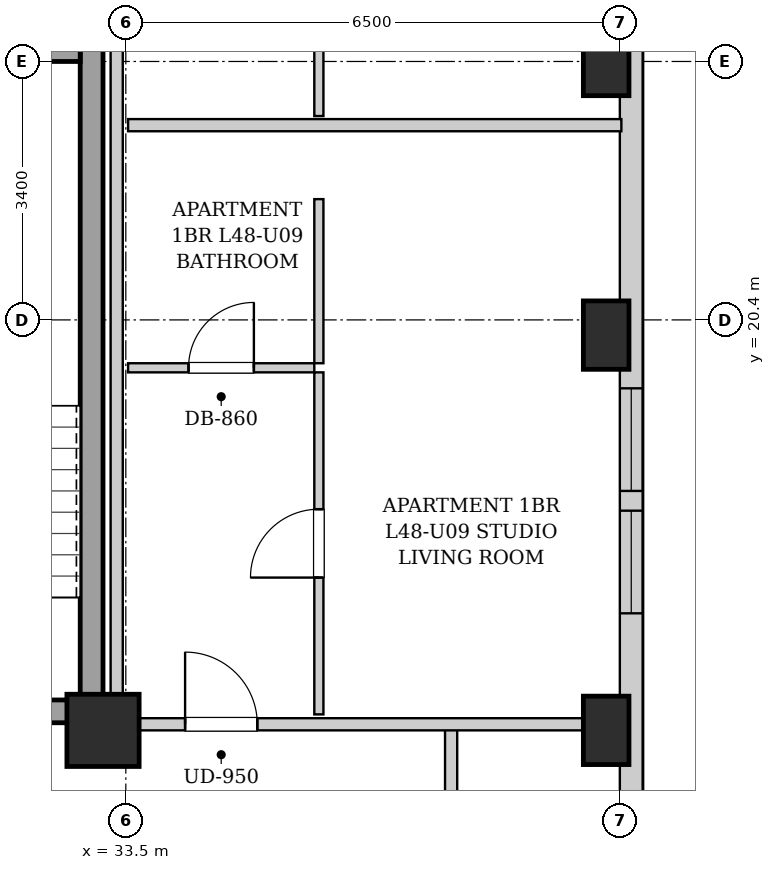
"""IFC4 building model, lengths in metres.
Left out: names, types, materials, properties, quantities, classifications, styles, units other than length and angle.
Written with IfcOpenShell. Run it as: python <this file> out.ifc"""

import sys

from ifc_helpers import new_model, si_unit, direction, frame, frame_2d, origin, origin_2d, place, context, subcontext, project, spatial, rectangle, extrude, element, fill, save


model = new_model("IFC4")
c1 = context("Model", 3, precision=1e-05, world=origin(), true_north=direction((0.0, 1.0)))
c2 = subcontext(c1, "Body", "Model", "MODEL_VIEW")
j1 = project(units=[si_unit("LENGTHUNIT", "METRE"), si_unit("PLANEANGLEUNIT", "RADIAN")], contexts=[c1])
p1 = place(None, origin())
s1 = spatial("IfcSite", under=j1, at=p1, CompositionType="ELEMENT")
p2 = place(p1, origin())
s2 = spatial("IfcBuilding", under=s1, at=p2, CompositionType="ELEMENT")
p3 = place(p2, frame((0.0, 0.0, 166.65)))
s3 = spatial("IfcBuildingStorey", under=s2, at=p3, CompositionType="ELEMENT", Elevation=166.65)
for number, where, z_axis, x_axis in (
    (1, (39.82, 15.0, 0.0), (0.0, 0.0, 1.0), (1.0, 0.0, 0.0)),
    (2, (39.82, 20.2, 0.0), (0.0, 0.0, 1.0), (1.0, 0.0, 0.0)),
    (3, (39.82, 23.8, 0.0), (0.0, 0.0, 1.0), (1.0, 0.0, 0.0)),
):
    element("IfcColumn", number, at=place(p3, frame(where, z_axis=z_axis, x_axis=x_axis)), inside=s3, PredefinedType="COLUMN", context=c2, shape_type="SweptSolid", body=[
        extrude(rectangle(XDim=0.6, YDim=0.9, at=origin_2d()), origin(), (0.0, 0.0, 1.0), 3.25),
    ])
p4 = place(p3, frame((33.2, 15.0, 0.0), z_axis=(0.0, 0.0, 1.0), x_axis=(1.0, 0.0, 0.0)))
e4 = element("IfcColumn", 4, at=p4, inside=s3, PredefinedType="COLUMN", context=c2, shape_type="SweptSolid", body=[
    extrude(rectangle(XDim=0.95, YDim=0.95, at=origin_2d()), origin(), (0.0, 0.0, 1.0), 3.25),
])
p5 = place(p3, frame((40.15, 40.8, 0.0), z_axis=(0.0, 0.0, 1.0), x_axis=(0.0, -1.0, 0.0)))
e5 = element("IfcWall", 5, at=p5, inside=s3, PredefinedType="SOLIDWALL", context=c2, shape_type="SweptSolid", body=[
    extrude(rectangle(XDim=34.5, YDim=0.3, at=frame_2d((17.25, 0.0))), origin(), (0.0, 0.0, 1.0), 2.93),
])
p6 = place(p5, frame((31.725, 0.0, 0.55)))
e6 = element("IfcOpeningElement", 6, at=p6, cuts=e5, PredefinedType="OPENING", context=c2, shape_type="SweptSolid", body=[
    extrude(rectangle(XDim=1.35, YDim=1.2, at=frame_2d((0.675, 0.6))), frame((0.0, 0.16, 0.0), z_axis=(0.0, -1.0, 0.0), x_axis=(1.0, 0.0, 0.0)), (0.0, 0.0, 1.0), 0.32),
])
p7 = place(p5, frame((3.0, 0.0, 0.55)))
e7 = element("IfcOpeningElement", 7, at=p7, cuts=e5, PredefinedType="OPENING", context=c2, shape_type="SweptSolid", body=[
    extrude(rectangle(XDim=1.35, YDim=1.2, at=frame_2d((0.675, 0.6))), frame((0.0, 0.16, 0.0), z_axis=(0.0, -1.0, 0.0), x_axis=(1.0, 0.0, 0.0)), (0.0, 0.0, 1.0), 0.32),
])
p8 = place(p5, frame((1.085, 0.0, 0.55)))
e8 = element("IfcOpeningElement", 8, at=p8, cuts=e5, PredefinedType="OPENING", context=c2, shape_type="SweptSolid", body=[
    extrude(rectangle(XDim=1.35, YDim=1.2, at=frame_2d((0.675, 0.6))), frame((0.0, 0.16, 0.0), z_axis=(0.0, -1.0, 0.0), x_axis=(1.0, 0.0, 0.0)), (0.0, 0.0, 1.0), 0.32),
])
p9 = place(p5, frame((21.3, 0.0, 0.55)))
e9 = element("IfcOpeningElement", 9, at=p9, cuts=e5, PredefinedType="OPENING", context=c2, shape_type="SweptSolid", body=[
    extrude(rectangle(XDim=1.35, YDim=1.2, at=frame_2d((0.675, 0.6))), frame((0.0, 0.16, 0.0), z_axis=(0.0, -1.0, 0.0), x_axis=(1.0, 0.0, 0.0)), (0.0, 0.0, 1.0), 0.32),
])
p10 = place(p5, frame((22.91, 0.0, 0.55)))
e10 = element("IfcOpeningElement", 10, at=p10, cuts=e5, PredefinedType="OPENING", context=c2, shape_type="SweptSolid", body=[
    extrude(rectangle(XDim=1.35, YDim=1.2, at=frame_2d((0.675, 0.6))), frame((0.0, 0.16, 0.0), z_axis=(0.0, -1.0, 0.0), x_axis=(1.0, 0.0, 0.0)), (0.0, 0.0, 1.0), 0.32),
])
p11 = place(p5, frame((14.175, 0.0, 0.55)))
e11 = element("IfcOpeningElement", 11, at=p11, cuts=e5, PredefinedType="OPENING", context=c2, shape_type="SweptSolid", body=[
    extrude(rectangle(XDim=1.35, YDim=1.2, at=frame_2d((0.675, 0.6))), frame((0.0, 0.16, 0.0), z_axis=(0.0, -1.0, 0.0), x_axis=(1.0, 0.0, 0.0)), (0.0, 0.0, 1.0), 0.32),
])
p12 = place(p5, frame((12.41, 0.0, 0.55)))
e12 = element("IfcOpeningElement", 12, at=p12, cuts=e5, PredefinedType="OPENING", context=c2, shape_type="SweptSolid", body=[
    extrude(rectangle(XDim=1.35, YDim=1.2, at=frame_2d((0.675, 0.6))), frame((0.0, 0.16, 0.0), z_axis=(0.0, -1.0, 0.0), x_axis=(1.0, 0.0, 0.0)), (0.0, 0.0, 1.0), 0.32),
])
p13 = place(p3, frame((33.05, 15.1, 0.0), z_axis=(0.0, 0.0, 1.0), x_axis=(0.0, 1.0, 0.0)))
e13 = element("IfcWall", 13, at=p13, inside=s3, PredefinedType="SHEAR", context=c2, shape_type="SweptSolid", body=[
    extrude(rectangle(XDim=9.0, YDim=0.3, at=frame_2d((4.5, 0.0))), origin(), (0.0, 0.0, 1.0), 2.93),
])
p14 = place(p3, frame((30.05, 23.95, 0.0), z_axis=(0.0, 0.0, 1.0), x_axis=(1.0, 0.0, 0.0)))
e14 = element("IfcWall", 14, at=p14, inside=s3, PredefinedType="SHEAR", context=c2, shape_type="SweptSolid", body=[
    extrude(rectangle(XDim=2.85, YDim=0.3, at=frame_2d((1.425, 0.0))), origin(), (0.0, 0.0, 1.0), 2.93),
])
p15 = place(p3, frame((30.05, 15.25, 0.0), z_axis=(0.0, 0.0, 1.0), x_axis=(1.0, 0.0, 0.0)))
e15 = element("IfcWall", 15, at=p15, inside=s3, PredefinedType="SHEAR", context=c2, shape_type="SweptSolid", body=[
    extrude(rectangle(XDim=2.85, YDim=0.3, at=frame_2d((1.425, 0.0))), origin(), (0.0, 0.0, 1.0), 2.93),
])
p16 = place(p15, frame((0.86, 0.0, 0.0)))
e16 = element("IfcOpeningElement", 16, at=p16, cuts=e15, PredefinedType="OPENING", context=c2, shape_type="SweptSolid", body=[
    extrude(rectangle(XDim=1.1, YDim=2.05, at=frame_2d((0.55, 1.025))), frame((0.0, 0.16, 0.0), z_axis=(0.0, -1.0, 0.0), x_axis=(1.0, 0.0, 0.0)), (0.0, 0.0, 1.0), 0.32),
])
p17 = place(p3, frame((37.78, 13.35, 0.0), z_axis=(0.0, 0.0, 1.0), x_axis=(0.0, 1.0, 0.0)))
e17 = element("IfcWall", 17, at=p17, inside=s3, PredefinedType="PARTITIONING", context=c2, shape_type="SweptSolid", body=[
    extrude(rectangle(XDim=1.74, YDim=0.16, at=frame_2d((0.87, 0.0))), origin(), (0.0, 0.0, 1.0), 2.93),
])
p18 = place(p3, frame((33.38, 15.08, 0.0), z_axis=(0.0, 0.0, 1.0), x_axis=(1.0, 0.0, 0.0)))
e18 = element("IfcWall", 18, at=p18, inside=s3, PredefinedType="PARTITIONING", context=c2, shape_type="SweptSolid", body=[
    extrude(rectangle(XDim=6.64, YDim=0.16, at=frame_2d((3.32, 0.0))), origin(), (0.0, 0.0, 1.0), 2.382),
])
p19 = place(p18, frame((0.9, 0.0, 0.0)))
e19 = element("IfcOpeningElement", 19, at=p19, cuts=e18, PredefinedType="OPENING", context=c2, shape_type="SweptSolid", body=[
    extrude(rectangle(XDim=0.95, YDim=2.1, at=frame_2d((0.475, 1.05))), frame((0.0, 0.09, 0.0), z_axis=(0.0, -1.0, 0.0), x_axis=(1.0, 0.0, 0.0)), (0.0, 0.0, 1.0), 0.18),
])
p20 = place(p3, frame((33.53, 22.962, 0.0), z_axis=(0.0, 0.0, 1.0), x_axis=(1.0, 0.0, 0.0)))
e20 = element("IfcWall", 20, at=p20, inside=s3, PredefinedType="PARTITIONING", context=c2, shape_type="SweptSolid", body=[
    extrude(rectangle(XDim=6.49, YDim=0.16, at=frame_2d((3.245, 0.0))), origin(), (0.0, 0.0, 1.0), 2.93),
])
p21 = place(p3, frame((33.53, 19.77, 0.0), z_axis=(0.0, 0.0, 1.0), x_axis=(1.0, 0.0, 0.0)))
e21 = element("IfcWall", 21, at=p21, inside=s3, PredefinedType="PARTITIONING", context=c2, shape_type="SweptSolid", body=[
    extrude(rectangle(XDim=2.45, YDim=0.12, at=frame_2d((1.225, 0.0))), origin(), (0.0, 0.0, 1.0), 2.93),
])
p22 = place(p21, frame((0.795, 0.0, 0.0)))
e22 = element("IfcOpeningElement", 22, at=p22, cuts=e21, PredefinedType="OPENING", context=c2, shape_type="SweptSolid", body=[
    extrude(rectangle(XDim=0.86, YDim=2.05, at=frame_2d((0.43, 1.025))), frame((0.0, 0.07, 0.0), z_axis=(0.0, -1.0, 0.0), x_axis=(1.0, 0.0, 0.0)), (0.0, 0.0, 1.0), 0.14),
])
p23 = place(p3, frame((36.04, 19.83, 0.0), z_axis=(0.0, 0.0, 1.0), x_axis=(0.0, 1.0, 0.0)))
e23 = element("IfcWall", 23, at=p23, inside=s3, PredefinedType="PARTITIONING", context=c2, shape_type="SweptSolid", body=[
    extrude(rectangle(XDim=2.159, YDim=0.12, at=frame_2d((1.08, 0.0))), origin(), (0.0, 0.0, 1.0), 2.93),
])
p24 = place(p3, frame((36.04, 15.21, 0.0), z_axis=(0.0, 0.0, 1.0), x_axis=(0.0, 1.0, 0.0)))
e24 = element("IfcWall", 24, at=p24, inside=s3, PredefinedType="PARTITIONING", context=c2, shape_type="SweptSolid", body=[
    extrude(rectangle(XDim=4.5, YDim=0.12, at=frame_2d((2.25, 0.0))), origin(), (0.0, 0.0, 1.0), 2.93),
])
p25 = place(p24, frame((1.8, 0.0, 0.0)))
e25 = element("IfcOpeningElement", 25, at=p25, cuts=e24, PredefinedType="OPENING", context=c2, shape_type="SweptSolid", body=[
    extrude(rectangle(XDim=0.9, YDim=2.05, at=frame_2d((0.45, 1.025))), frame((0.0, 0.07, 0.0), z_axis=(0.0, -1.0, 0.0), x_axis=(1.0, 0.0, 0.0)), (0.0, 0.0, 1.0), 0.14),
])
p26 = place(p3, frame((36.04, 23.082, 0.0), z_axis=(0.0, 0.0, 1.0), x_axis=(0.0, 1.0, 0.0)))
e26 = element("IfcWall", 26, at=p26, inside=s3, PredefinedType="PARTITIONING", context=c2, shape_type="SweptSolid", body=[
    extrude(rectangle(XDim=1.85, YDim=0.12, at=frame_2d((0.925, 0.0))), origin(), (0.0, 0.0, 1.0), 2.93),
])
p27 = place(p3, frame((33.38, 15.02, 0.0), z_axis=(0.0, 0.0, 1.0), x_axis=(0.0, 1.0, 0.0)))
e27 = element("IfcWall", 27, at=p27, inside=s3, PredefinedType="PARTITIONING", context=c2, shape_type="SweptSolid", body=[
    extrude(rectangle(XDim=13.98, YDim=0.16, at=frame_2d((6.99, 0.0))), origin(), (0.0, 0.0, 1.0), 2.265),
])
p28 = place(p19, origin())
e28 = element("IfcDoor", 28, at=p28, inside=s3, OperationType="SINGLE_SWING_LEFT", PredefinedType="DOOR", context=c2, shape_type="SweptSolid", body=[
    extrude(rectangle(XDim=0.95, YDim=2.1, at=frame_2d((0.475, 1.05))), frame((0.0, 0.025, 0.0), z_axis=(0.0, -1.0, 0.0), x_axis=(1.0, 0.0, 0.0)), (0.0, 0.0, 1.0), 0.05),
])
fill(e19, e28)
p29 = place(p22, origin())
e29 = element("IfcDoor", 29, at=p29, inside=s3, OperationType="SINGLE_SWING_RIGHT", PredefinedType="DOOR", context=c2, shape_type="SweptSolid", body=[
    extrude(rectangle(XDim=0.86, YDim=2.05, at=frame_2d((0.43, 1.025))), frame((0.0, 0.025, 0.0), z_axis=(0.0, -1.0, 0.0), x_axis=(1.0, 0.0, 0.0)), (0.0, 0.0, 1.0), 0.05),
])
fill(e22, e29)
p30 = place(p25, origin())
e30 = element("IfcDoor", 30, at=p30, inside=s3, OperationType="SINGLE_SWING_LEFT", PredefinedType="DOOR", context=c2, shape_type="SweptSolid", body=[
    extrude(rectangle(XDim=0.9, YDim=2.05, at=frame_2d((0.45, 1.025))), frame((0.0, 0.025, 0.0), z_axis=(0.0, -1.0, 0.0), x_axis=(1.0, 0.0, 0.0)), (0.0, 0.0, 1.0), 0.05),
])
fill(e25, e30)
p31 = place(p9, origin())
e31 = element("IfcWindow", 31, at=p31, inside=s3, PartitioningType="SINGLE_PANEL", PredefinedType="WINDOW", context=c2, shape_type="SweptSolid", body=[
    extrude(rectangle(XDim=1.35, YDim=1.2, at=frame_2d((0.675, 0.6))), frame((0.0, 0.03, 0.0), z_axis=(0.0, -1.0, 0.0), x_axis=(1.0, 0.0, 0.0)), (0.0, 0.0, 1.0), 0.06),
])
fill(e9, e31)
p32 = place(p10, origin())
e32 = element("IfcWindow", 32, at=p32, inside=s3, PartitioningType="SINGLE_PANEL", PredefinedType="WINDOW", context=c2, shape_type="SweptSolid", body=[
    extrude(rectangle(XDim=1.35, YDim=1.2, at=frame_2d((0.675, 0.6))), frame((0.0, 0.03, 0.0), z_axis=(0.0, -1.0, 0.0), x_axis=(1.0, 0.0, 0.0)), (0.0, 0.0, 1.0), 0.06),
])
fill(e10, e32)
save(model, sys.argv[1])
